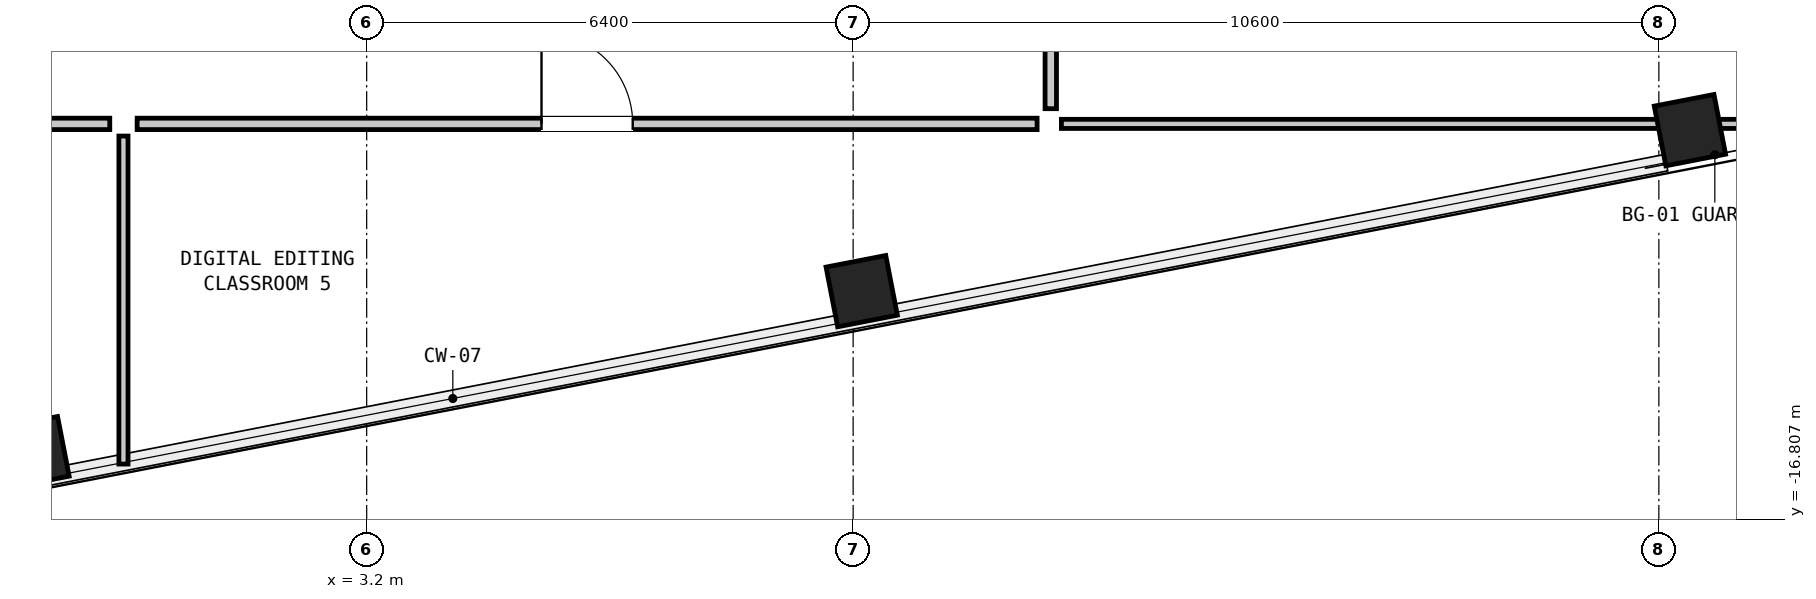
"""IFC4 building model, lengths in metres.
Left out: names, types, materials, properties, quantities, classifications, styles, units other than length and angle.
Written with IfcOpenShell. Run it as: python <this file> out.ifc"""

import sys

from ifc_helpers import new_model, si_unit, direction, frame, frame_2d, origin, origin_2d, place, context, subcontext, project, spatial, rectangle, hollow_rectangle, extrude, element, fill, save


model = new_model("IFC4")
c1 = context("Model", 3, precision=1e-05, world=origin(), true_north=direction((0.0, 1.0)))
c2 = subcontext(c1, "Body", "Model", "MODEL_VIEW")
j1 = project(units=[si_unit("LENGTHUNIT", "METRE"), si_unit("PLANEANGLEUNIT", "RADIAN")], contexts=[c1])
p1 = place(None, origin())
s1 = spatial("IfcSite", under=j1, at=p1, CompositionType="ELEMENT")
p2 = place(p1, origin())
s2 = spatial("IfcBuilding", under=s1, at=p2, CompositionType="ELEMENT")
p3 = place(p2, frame((0.0, 0.0, 140.25)))
s3 = spatial("IfcBuildingStorey", under=s2, at=p3, CompositionType="ELEMENT", Elevation=140.25)
for number, where, z_axis, x_axis in (
    (1, (-1.183, -15.918, 0.0), (0.0, 0.0, 1.0), (0.982, 0.191, 0.0)),
    (2, (9.713, -13.8, 0.0), (0.0, 0.0, 1.0), (0.982, 0.191, 0.0)),
    (3, (20.609, -11.682, 0.0), (0.0, 0.0, 1.0), (0.982, 0.191, 0.0)),
):
    element("IfcColumn", number, at=place(p3, frame(where, z_axis=z_axis, x_axis=x_axis)), inside=s3, PredefinedType="COLUMN", context=c2, shape_type="SweptSolid", body=[
        extrude(hollow_rectangle(XDim=0.8, YDim=0.8, WallThickness=0.05, at=origin_2d()), origin(), (0.0, 0.0, 1.0), 4.35),
    ])
p4 = place(p3, frame((12.34, -11.6, 0.0), z_axis=(0.0, 0.0, 1.0), x_axis=(1.0, 0.0, 0.0)))
e4 = element("IfcWall", 4, at=p4, inside=s3, PredefinedType="PARTITIONING", context=c2, shape_type="SweptSolid", body=[
    extrude(rectangle(XDim=10.066, YDim=0.12, at=frame_2d((5.033, 0.0))), origin(), (0.0, 0.0, 1.0), 2.25),
])
p5 = place(p3, frame((0.0, -16.075, 0.0), z_axis=(0.0, 0.0, 1.0), x_axis=(0.0, 1.0, 0.0)))
e5 = element("IfcWall", 5, at=p5, inside=s3, PredefinedType="PARTITIONING", context=c2, shape_type="SweptSolid", body=[
    extrude(rectangle(XDim=4.315, YDim=0.12, at=frame_2d((2.158, 0.0))), origin(), (0.0, 0.0, 1.0), 2.25),
])
p6 = place(p3, frame((-12.02, -11.6, 0.0), z_axis=(0.0, 0.0, 1.0), x_axis=(1.0, 0.0, 0.0)))
e6 = element("IfcWall", 6, at=p6, inside=s3, PredefinedType="PARTITIONING", context=c2, shape_type="SweptSolid", body=[
    extrude(rectangle(XDim=11.84, YDim=0.15, at=frame_2d((5.92, 0.0))), origin(), (0.0, 0.0, 1.0), 2.25),
])
p7 = place(p6, frame((4.52, 0.0, 0.0)))
e7 = element("IfcOpeningElement", 7, at=p7, cuts=e6, PredefinedType="OPENING", context=c2, shape_type="SweptSolid", body=[
    extrude(rectangle(XDim=1.2, YDim=2.1, at=frame_2d((0.6, 1.05))), frame((0.0, 0.087, 0.0), z_axis=(0.0, -1.0, 0.0), x_axis=(1.0, 0.0, 0.0)), (0.0, 0.0, 1.0), 0.174),
])
p8 = place(p3, frame((0.18, -11.6, 0.0), z_axis=(0.0, 0.0, 1.0), x_axis=(1.0, 0.0, 0.0)))
e8 = element("IfcWall", 8, at=p8, inside=s3, PredefinedType="PARTITIONING", context=c2, shape_type="SweptSolid", body=[
    extrude(rectangle(XDim=11.84, YDim=0.15, at=frame_2d((5.92, 0.0))), origin(), (0.0, 0.0, 1.0), 2.25),
])
p9 = place(p8, frame((5.32, 0.0, 0.0)))
e9 = element("IfcOpeningElement", 9, at=p9, cuts=e8, PredefinedType="OPENING", context=c2, shape_type="SweptSolid", body=[
    extrude(rectangle(XDim=1.2, YDim=2.1, at=frame_2d((0.6, 1.05))), frame((0.0, 0.087, 0.0), z_axis=(0.0, -1.0, 0.0), x_axis=(1.0, 0.0, 0.0)), (0.0, 0.0, 1.0), 0.174),
])
p10 = place(p3, frame((12.2, -11.4, 0.0), z_axis=(0.0, 0.0, 1.0), x_axis=(0.0, 1.0, 0.0)))
e10 = element("IfcWall", 10, at=p10, inside=s3, PredefinedType="PARTITIONING", context=c2, shape_type="SweptSolid", body=[
    extrude(rectangle(XDim=8.84, YDim=0.15, at=frame_2d((4.42, 0.0))), origin(), (0.0, 0.0, 1.0), 4.07),
])
p11 = place(p10, frame((3.945, 0.0, 0.0)))
e11 = element("IfcOpeningElement", 11, at=p11, cuts=e10, PredefinedType="OPENING", context=c2, shape_type="SweptSolid", body=[
    extrude(rectangle(XDim=0.95, YDim=2.1, at=frame_2d((0.475, 1.05))), frame((0.0, 0.087, 0.0), z_axis=(0.0, -1.0, 0.0), x_axis=(1.0, 0.0, 0.0)), (0.0, 0.0, 1.0), 0.174),
])
p12 = place(p9, origin())
e12 = element("IfcDoor", 12, at=p12, inside=s3, OperationType="SINGLE_SWING_LEFT", PredefinedType="DOOR", context=c2, shape_type="SweptSolid", body=[
    extrude(rectangle(XDim=1.2, YDim=2.1, at=frame_2d((0.6, 1.05))), frame((0.0, 0.025, 0.0), z_axis=(0.0, -1.0, 0.0), x_axis=(1.0, 0.0, 0.0)), (0.0, 0.0, 1.0), 0.05),
])
fill(e9, e12)
save(model, sys.argv[1])
